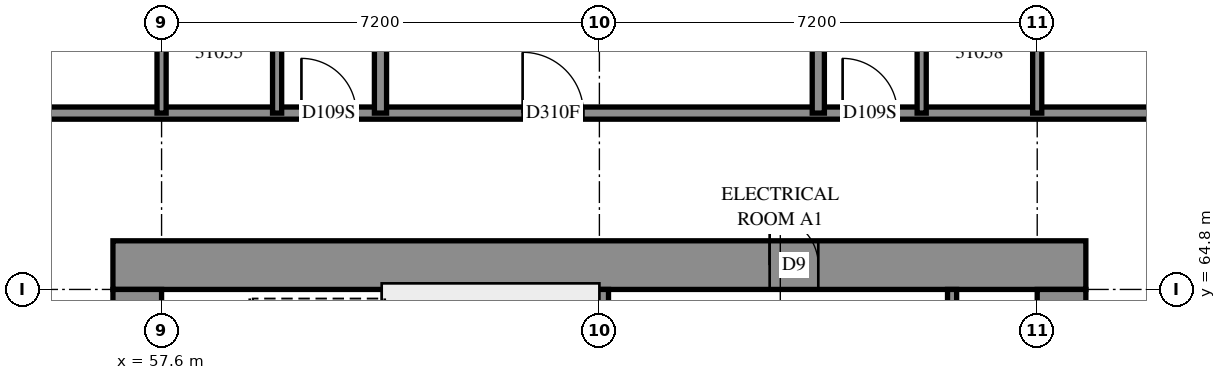
"""IFC4 building model, lengths in metres.
Left out: names, types, materials, properties, quantities, classifications, styles, units other than length and angle.
Written with IfcOpenShell. Run it as: python <this file> out.ifc"""

import sys

from ifc_helpers import new_model, si_unit, direction, frame, frame_2d, origin, place, context, subcontext, project, spatial, rectangle, extrude, element, fill, save


model = new_model("IFC4")
c1 = context("Model", 3, precision=1e-05, world=origin(), true_north=direction((0.0, 1.0)))
c2 = subcontext(c1, "Body", "Model", "MODEL_VIEW")
j1 = project(units=[si_unit("LENGTHUNIT", "METRE"), si_unit("PLANEANGLEUNIT", "RADIAN")], contexts=[c1])
p1 = place(None, origin())
s1 = spatial("IfcSite", under=j1, at=p1, CompositionType="ELEMENT")
p2 = place(p1, origin())
s2 = spatial("IfcBuilding", under=s1, at=p2, CompositionType="ELEMENT")
p3 = place(p2, frame((0.0, 0.0, 115.2)))
s3 = spatial("IfcBuildingStorey", under=s2, at=p3, CompositionType="ELEMENT", Elevation=115.2)
p4 = place(p3, frame((56.8, 65.2, -0.3), z_axis=(0.0, 0.0, 1.0), x_axis=(1.0, 0.0, 0.0)))
e1 = element("IfcWall", 1, at=p4, inside=s3, PredefinedType="SHEAR", context=c2, shape_type="SweptSolid", body=[
    extrude(rectangle(XDim=16.0, YDim=0.8, at=frame_2d((8.0, 0.0))), origin(), (0.0, 0.0, 1.0), 2.7),
])
p5 = place(p4, frame((10.8, 0.0, 0.3)))
e2 = element("IfcOpeningElement", 2, at=p5, cuts=e1, PredefinedType="OPENING", context=c2, shape_type="SweptSolid", body=[
    extrude(rectangle(XDim=0.8, YDim=2.1, at=frame_2d((0.4, 1.05))), frame((0.0, 0.41, 0.0), z_axis=(0.0, -1.0, 0.0), x_axis=(1.0, 0.0, 0.0)), (0.0, 0.0, 1.0), 0.82),
])
p6 = place(p3, frame((57.2, 50.4, -0.3), z_axis=(0.0, 0.0, 1.0), x_axis=(0.0, 1.0, 0.0)))
e3 = element("IfcWall", 3, at=p6, inside=s3, PredefinedType="SHEAR", context=c2, shape_type="SweptSolid", body=[
    extrude(rectangle(XDim=14.4, YDim=0.8, at=frame_2d((7.2, 0.0))), origin(), (0.0, 0.0, 1.0), 2.7),
])
p7 = place(p6, frame((4.55, 0.0, 0.3)))
e4 = element("IfcOpeningElement", 4, at=p7, cuts=e3, PredefinedType="OPENING", context=c2, shape_type="SweptSolid", body=[
    extrude(rectangle(XDim=1.1, YDim=2.1, at=frame_2d((0.55, 1.05))), frame((0.0, 0.41, 0.0), z_axis=(0.0, -1.0, 0.0), x_axis=(1.0, 0.0, 0.0)), (0.0, 0.0, 1.0), 0.82),
])
p8 = place(p6, frame((11.35, 0.0, 0.3)))
e5 = element("IfcOpeningElement", 5, at=p8, cuts=e3, PredefinedType="OPENING", context=c2, shape_type="SweptSolid", body=[
    extrude(rectangle(XDim=1.1, YDim=2.1, at=frame_2d((0.55, 1.05))), frame((0.0, 0.41, 0.0), z_axis=(0.0, -1.0, 0.0), x_axis=(1.0, 0.0, 0.0)), (0.0, 0.0, 1.0), 0.82),
])
p9 = place(p3, frame((72.4, 50.4, -0.3), z_axis=(0.0, 0.0, 1.0), x_axis=(0.0, 1.0, 0.0)))
e6 = element("IfcWall", 6, at=p9, inside=s3, PredefinedType="SHEAR", context=c2, shape_type="SweptSolid", body=[
    extrude(rectangle(XDim=14.4, YDim=0.8, at=frame_2d((7.2, 0.0))), origin(), (0.0, 0.0, 1.0), 2.7),
])
p10 = place(p9, frame((4.55, 0.0, 0.3)))
e7 = element("IfcOpeningElement", 7, at=p10, cuts=e6, PredefinedType="OPENING", context=c2, shape_type="SweptSolid", body=[
    extrude(rectangle(XDim=1.1, YDim=2.1, at=frame_2d((0.55, 1.05))), frame((0.0, 0.41, 0.0), z_axis=(0.0, -1.0, 0.0), x_axis=(1.0, 0.0, 0.0)), (0.0, 0.0, 1.0), 0.82),
])
p11 = place(p9, frame((11.35, 0.0, 0.3)))
e8 = element("IfcOpeningElement", 8, at=p11, cuts=e6, PredefinedType="OPENING", context=c2, shape_type="SweptSolid", body=[
    extrude(rectangle(XDim=1.1, YDim=2.1, at=frame_2d((0.55, 1.05))), frame((0.0, 0.41, 0.0), z_axis=(0.0, -1.0, 0.0), x_axis=(1.0, 0.0, 0.0)), (0.0, 0.0, 1.0), 0.82),
])
p12 = place(p3, frame((64.8, 60.6, 0.0), z_axis=(0.0, 0.0, 1.0), x_axis=(0.0, 1.0, 0.0)))
e9 = element("IfcWall", 9, at=p12, inside=s3, PredefinedType="SOLIDWALL", context=c2, shape_type="SweptSolid", body=[
    extrude(rectangle(XDim=4.2, YDim=0.3, at=frame_2d((2.1, 0.0))), origin(), (0.0, 0.0, 1.0), 3.1),
])
p13 = place(p3, frame((70.6, 63.78, 0.0), z_axis=(0.0, 0.0, 1.0), x_axis=(0.0, 1.0, 0.0)))
e10 = element("IfcWall", 10, at=p13, inside=s3, PredefinedType="PARTITIONING", context=c2, shape_type="SweptSolid", body=[
    extrude(rectangle(XDim=1.02, YDim=0.15, at=frame_2d((0.51, 0.0))), origin(), (0.0, 0.0, 1.0), 3.1),
])
p14 = place(p3, frame((54.7, 67.7, 0.0), z_axis=(0.0, 0.0, 1.0), x_axis=(1.0, 0.0, 0.0)))
e11 = element("IfcWall", 11, at=p14, inside=s3, PredefinedType="PARTITIONING", context=c2, shape_type="SweptSolid", body=[
    extrude(rectangle(XDim=20.2, YDim=0.2, at=frame_2d((10.1, 0.0))), origin(), (0.0, 0.0, 1.0), 3.1),
])
p15 = place(p14, frame((5.2, 0.0, 0.0)))
e12 = element("IfcOpeningElement", 12, at=p15, cuts=e11, PredefinedType="OPENING", context=c2, shape_type="SweptSolid", body=[
    extrude(rectangle(XDim=0.9, YDim=2.1, at=frame_2d((0.45, 1.05))), frame((0.0, 0.11, 0.0), z_axis=(0.0, -1.0, 0.0), x_axis=(1.0, 0.0, 0.0)), (0.0, 0.0, 1.0), 0.22),
])
p16 = place(p14, frame((8.838, 0.0, 0.0)))
e13 = element("IfcOpeningElement", 13, at=p16, cuts=e11, PredefinedType="OPENING", context=c2, shape_type="SweptSolid", body=[
    extrude(rectangle(XDim=1.0, YDim=2.1, at=frame_2d((0.5, 1.05))), frame((0.0, 0.11, 0.0), z_axis=(0.0, -1.0, 0.0), x_axis=(1.0, 0.0, 0.0)), (0.0, 0.0, 1.0), 0.22),
])
p17 = place(p14, frame((14.1, 0.0, 0.0)))
e14 = element("IfcOpeningElement", 14, at=p17, cuts=e11, PredefinedType="OPENING", context=c2, shape_type="SweptSolid", body=[
    extrude(rectangle(XDim=0.9, YDim=2.1, at=frame_2d((0.45, 1.05))), frame((0.0, 0.11, 0.0), z_axis=(0.0, -1.0, 0.0), x_axis=(1.0, 0.0, 0.0)), (0.0, 0.0, 1.0), 0.22),
])
p18 = place(p3, frame((68.4, 67.7, 0.0), z_axis=(0.0, 0.0, 1.0), x_axis=(0.0, 1.0, 0.0)))
e15 = element("IfcWall", 15, at=p18, inside=s3, PredefinedType="PARTITIONING", context=c2, shape_type="SweptSolid", body=[
    extrude(rectangle(XDim=5.0, YDim=0.2, at=frame_2d((2.5, 0.0))), origin(), (0.0, 0.0, 1.0), 3.1),
])
p19 = place(p3, frame((61.2, 67.7, 0.0), z_axis=(0.0, 0.0, 1.0), x_axis=(0.0, 1.0, 0.0)))
e16 = element("IfcWall", 16, at=p19, inside=s3, PredefinedType="PARTITIONING", context=c2, shape_type="SweptSolid", body=[
    extrude(rectangle(XDim=4.954, YDim=0.2, at=frame_2d((2.477, 0.0))), origin(), (0.0, 0.0, 1.0), 3.1),
])
for number, where, z_axis, x_axis in (
    (17, (59.5, 67.7, 0.0), (0.0, 0.0, 1.0), (0.0, 1.0, 0.0)),
    (18, (57.6, 67.7, 0.0), (0.0, 0.0, 1.0), (0.0, 1.0, 0.0)),
    (19, (70.1, 67.7, 0.0), (0.0, 0.0, 1.0), (0.0, 1.0, 0.0)),
    (20, (72.0, 67.7, 0.0), (0.0, 0.0, 1.0), (0.0, 1.0, 0.0)),
):
    element("IfcWall", number, at=place(p3, frame(where, z_axis=z_axis, x_axis=x_axis)), inside=s3, PredefinedType="PARTITIONING", context=c2, shape_type="SweptSolid", body=[
        extrude(rectangle(XDim=2.4, YDim=0.15, at=frame_2d((1.2, 0.0))), origin(), (0.0, 0.0, 1.0), 3.1),
    ])
p20 = place(p5, origin())
e21 = element("IfcDoor", 21, at=p20, inside=s3, OperationType="SINGLE_SWING_RIGHT", PredefinedType="DOOR", context=c2, shape_type="SweptSolid", body=[
    extrude(rectangle(XDim=0.8, YDim=2.1, at=frame_2d((0.4, 1.05))), frame((0.0, -0.34, 0.0), z_axis=(0.0, -1.0, 0.0), x_axis=(1.0, 0.0, 0.0)), (0.0, 0.0, 1.0), 0.05),
])
fill(e2, e21)
p21 = place(p15, origin())
e22 = element("IfcDoor", 22, at=p21, inside=s3, OperationType="SINGLE_SWING_RIGHT", PredefinedType="DOOR", context=c2, shape_type="SweptSolid", body=[
    extrude(rectangle(XDim=0.9, YDim=2.1, at=frame_2d((0.45, 1.05))), frame((0.0, 0.025, 0.0), z_axis=(0.0, -1.0, 0.0), x_axis=(1.0, 0.0, 0.0)), (0.0, 0.0, 1.0), 0.05),
])
fill(e12, e22)
p22 = place(p16, origin())
e23 = element("IfcDoor", 23, at=p22, inside=s3, OperationType="SINGLE_SWING_LEFT", PredefinedType="DOOR", context=c2, shape_type="SweptSolid", body=[
    extrude(rectangle(XDim=1.0, YDim=2.1, at=frame_2d((0.5, 1.05))), frame((0.0, 0.025, 0.0), z_axis=(0.0, -1.0, 0.0), x_axis=(1.0, 0.0, 0.0)), (0.0, 0.0, 1.0), 0.05),
])
fill(e13, e23)
p23 = place(p17, origin())
e24 = element("IfcDoor", 24, at=p23, inside=s3, OperationType="SINGLE_SWING_LEFT", PredefinedType="DOOR", context=c2, shape_type="SweptSolid", body=[
    extrude(rectangle(XDim=0.9, YDim=2.1, at=frame_2d((0.45, 1.05))), frame((0.0, 0.025, 0.0), z_axis=(0.0, -1.0, 0.0), x_axis=(1.0, 0.0, 0.0)), (0.0, 0.0, 1.0), 0.05),
])
fill(e14, e24)
save(model, sys.argv[1])
